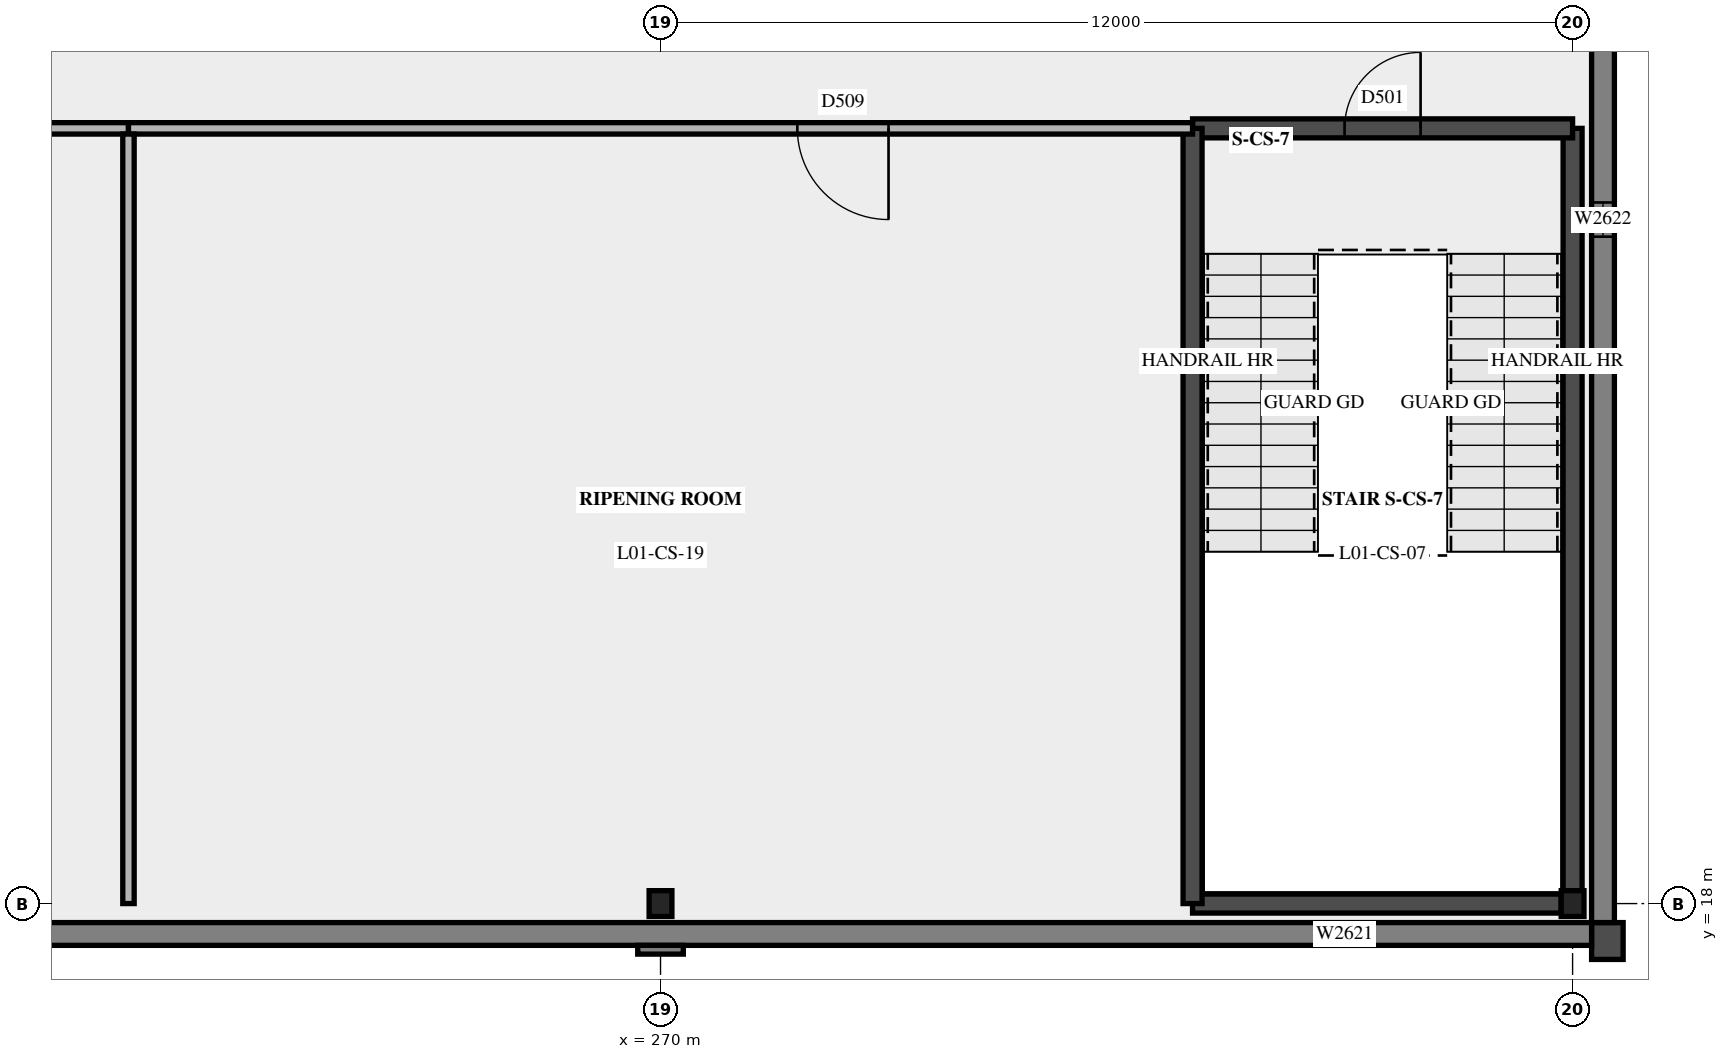
"""IFC4 building model, lengths in metres.
Left out: names, types, materials, properties, quantities, classifications, styles, units other than length and angle.
Written with IfcOpenShell. Run it as: python <this file> out.ifc"""

import sys

from ifc_helpers import new_model, si_unit, direction, frame, frame_2d, origin, origin_2d, place, context, subcontext, project, spatial, polyline, rectangle, i_section, outline, extrude, element, fill, save


model = new_model("IFC4")
c1 = context("Model", 3, precision=1e-05, world=origin(), true_north=direction((0.0, 1.0)))
c2 = subcontext(c1, "Body", "Model", "MODEL_VIEW")
j1 = project(units=[si_unit("LENGTHUNIT", "METRE"), si_unit("PLANEANGLEUNIT", "RADIAN")], contexts=[c1])
p1 = place(None, origin())
s1 = spatial("IfcSite", under=j1, at=p1, CompositionType="ELEMENT")
p2 = place(p1, origin())
s2 = spatial("IfcBuilding", under=s1, at=p2, CompositionType="ELEMENT")
p3 = place(p2, frame((0.0, 0.0, 5.4)))
s3 = spatial("IfcBuildingStorey", under=s2, at=p3, CompositionType="ELEMENT", Elevation=5.4)
for number, where, z_axis, x_axis in (
    (1, (270.0, 18.0, 0.0), (0.0, 0.0, 1.0), (1.0, 0.0, 0.0)),
    (2, (282.0, 18.0, 0.0), (0.0, 0.0, 1.0), (1.0, 0.0, 0.0)),
):
    element("IfcColumn", number, at=place(p3, frame(where, z_axis=z_axis, x_axis=x_axis)), inside=s3, PredefinedType="COLUMN", context=c2, shape_type="SweptSolid", body=[
        extrude(i_section(OverallWidth=0.3, OverallDepth=0.34, WebThickness=0.012, FlangeThickness=0.021, at=origin_2d()), origin(), (0.0, 0.0, 1.0), 5.4),
    ])
p4 = place(p3, frame((277.0, 18.0, 0.0), z_axis=(0.0, 0.0, 1.0), x_axis=(1.0, 0.0, 0.0)))
e3 = element("IfcWall", 3, at=p4, inside=s3, PredefinedType="SHEAR", context=c2, shape_type="SweptSolid", body=[
    extrude(rectangle(XDim=4.85, YDim=0.25, at=frame_2d((2.425, 0.0))), origin(), (0.0, 0.0, 1.0), 5.4),
])
p5 = place(p3, frame((282.0, 18.17, 0.0), z_axis=(0.0, 0.0, 1.0), x_axis=(0.0, 1.0, 0.0)))
e4 = element("IfcWall", 4, at=p5, inside=s3, PredefinedType="SHEAR", context=c2, shape_type="SweptSolid", body=[
    extrude(rectangle(XDim=10.03, YDim=0.25, at=frame_2d((5.015, 0.0))), origin(), (0.0, 0.0, 1.0), 5.4),
])
p6 = place(p3, frame((277.0, 28.2, 0.0), z_axis=(0.0, 0.0, 1.0), x_axis=(1.0, 0.0, 0.0)))
e5 = element("IfcWall", 5, at=p6, inside=s3, PredefinedType="SHEAR", context=c2, shape_type="SweptSolid", body=[
    extrude(rectangle(XDim=5.0, YDim=0.25, at=frame_2d((2.5, 0.0))), origin(), (0.0, 0.0, 1.0), 5.4),
])
p7 = place(p6, frame((2.0, 0.0, 0.0)))
e6 = element("IfcOpeningElement", 6, at=p7, cuts=e5, PredefinedType="OPENING", context=c2, shape_type="SweptSolid", body=[
    extrude(rectangle(XDim=1.0, YDim=2.1, at=frame_2d((0.5, 1.05))), frame((0.0, 0.135, 0.0), z_axis=(0.0, -1.0, 0.0), x_axis=(1.0, 0.0, 0.0)), (0.0, 0.0, 1.0), 0.27),
])
p8 = place(p3, frame((277.0, 18.0, 0.0), z_axis=(0.0, 0.0, 1.0), x_axis=(0.0, 1.0, 0.0)))
e7 = element("IfcWall", 7, at=p8, inside=s3, PredefinedType="SHEAR", context=c2, shape_type="SweptSolid", body=[
    extrude(rectangle(XDim=10.2, YDim=0.25, at=frame_2d((5.1, 0.0))), origin(), (0.0, 0.0, 1.0), 5.4),
])
p9 = place(p3, frame((282.25, 17.472, -0.39), z_axis=(0.0, 0.0, 1.0), x_axis=(1.0, 0.0, 0.0)))
e8 = element("IfcWall", 8, at=p9, inside=s3, PredefinedType="SOLIDWALL", context=c2, shape_type="SweptSolid", body=[
    extrude(rectangle(XDim=0.53, YDim=0.555, at=frame_2d((0.265, 0.0))), origin(), (0.0, 0.0, 1.0), 0.13),
])
p10 = place(p3, frame((282.25, 17.438, -0.26), z_axis=(0.0, 0.0, 1.0), x_axis=(1.0, 0.0, 0.0)))
e9 = element("IfcWall", 9, at=p10, inside=s3, PredefinedType="SOLIDWALL", context=c2, shape_type="SweptSolid", body=[
    extrude(rectangle(XDim=0.645, YDim=0.625, at=frame_2d((0.323, 0.0))), origin(), (0.0, 0.0, 1.0), 0.13),
])
p11 = place(p3, frame((282.25, 17.403, -0.13), z_axis=(0.0, 0.0, 1.0), x_axis=(1.0, 0.0, 0.0)))
e10 = element("IfcWall", 10, at=p11, inside=s3, PredefinedType="SOLIDWALL", context=c2, shape_type="SweptSolid", body=[
    extrude(rectangle(XDim=0.76, YDim=0.695, at=frame_2d((0.38, 0.0))), origin(), (0.0, 0.0, 1.0), 0.13),
])
p12 = place(p3, frame((282.25, 17.508, 0.0), z_axis=(0.0, 0.0, 1.0), x_axis=(1.0, 0.0, 0.0)))
e11 = element("IfcWall", 11, at=p12, inside=s3, PredefinedType="SOLIDWALL", context=c2, shape_type="SweptSolid", body=[
    extrude(rectangle(XDim=0.415, YDim=0.485, at=frame_2d((0.208, 0.0))), origin(), (0.0, 0.0, 1.0), 5.01),
])
p13 = place(p3, frame((282.25, 17.472, 5.01), z_axis=(0.0, 0.0, 1.0), x_axis=(1.0, 0.0, 0.0)))
e12 = element("IfcWall", 12, at=p13, inside=s3, PredefinedType="SOLIDWALL", context=c2, shape_type="SweptSolid", body=[
    extrude(rectangle(XDim=0.53, YDim=0.555, at=frame_2d((0.265, 0.0))), origin(), (0.0, 0.0, 1.0), 0.13),
])
p14 = place(p3, frame((282.25, 17.438, 5.14), z_axis=(0.0, 0.0, 1.0), x_axis=(1.0, 0.0, 0.0)))
e13 = element("IfcWall", 13, at=p14, inside=s3, PredefinedType="SOLIDWALL", context=c2, shape_type="SweptSolid", body=[
    extrude(rectangle(XDim=0.645, YDim=0.625, at=frame_2d((0.323, 0.0))), origin(), (0.0, 0.0, 1.0), 0.13),
])
p15 = place(p3, frame((282.25, 17.403, 5.27), z_axis=(0.0, 0.0, 1.0), x_axis=(1.0, 0.0, 0.0)))
e14 = element("IfcWall", 14, at=p15, inside=s3, PredefinedType="SOLIDWALL", context=c2, shape_type="SweptSolid", body=[
    extrude(rectangle(XDim=0.76, YDim=0.695, at=frame_2d((0.38, 0.0))), origin(), (0.0, 0.0, 1.0), 0.13),
])
p16 = place(p3, frame((197.75, 17.6, 0.0), z_axis=(0.0, 0.0, 1.0), x_axis=(1.0, 0.0, 0.0)))
e15 = element("IfcWall", 15, at=p16, inside=s3, PredefinedType="SOLIDWALL", context=c2, shape_type="SweptSolid", body=[
    extrude(rectangle(XDim=84.5, YDim=0.3, at=frame_2d((42.25, 0.0))), origin(), (0.0, 0.0, 1.0), 5.4),
])
p17 = place(p16, frame((9.025, 0.0, 1.8)))
e16 = element("IfcOpeningElement", 16, at=p17, cuts=e15, PredefinedType="OPENING", context=c2, shape_type="SweptSolid", body=[
    extrude(rectangle(XDim=0.45, YDim=2.4, at=frame_2d((0.225, 1.2))), frame((0.0, 0.16, 0.0), z_axis=(0.0, -1.0, 0.0), x_axis=(1.0, 0.0, 0.0)), (0.0, 0.0, 1.0), 0.32),
])
p18 = place(p16, frame((33.025, 0.0, 1.8)))
e17 = element("IfcOpeningElement", 17, at=p18, cuts=e15, PredefinedType="OPENING", context=c2, shape_type="SweptSolid", body=[
    extrude(rectangle(XDim=0.45, YDim=2.4, at=frame_2d((0.225, 1.2))), frame((0.0, 0.16, 0.0), z_axis=(0.0, -1.0, 0.0), x_axis=(1.0, 0.0, 0.0)), (0.0, 0.0, 1.0), 0.32),
])
p19 = place(p16, frame((45.025, 0.0, 1.8)))
e18 = element("IfcOpeningElement", 18, at=p19, cuts=e15, PredefinedType="OPENING", context=c2, shape_type="SweptSolid", body=[
    extrude(rectangle(XDim=0.45, YDim=2.4, at=frame_2d((0.225, 1.2))), frame((0.0, 0.16, 0.0), z_axis=(0.0, -1.0, 0.0), x_axis=(1.0, 0.0, 0.0)), (0.0, 0.0, 1.0), 0.32),
])
p20 = place(p16, frame((57.025, 0.0, 1.8)))
e19 = element("IfcOpeningElement", 19, at=p20, cuts=e15, PredefinedType="OPENING", context=c2, shape_type="SweptSolid", body=[
    extrude(rectangle(XDim=0.45, YDim=2.4, at=frame_2d((0.225, 1.2))), frame((0.0, 0.16, 0.0), z_axis=(0.0, -1.0, 0.0), x_axis=(1.0, 0.0, 0.0)), (0.0, 0.0, 1.0), 0.32),
])
p21 = place(p16, frame((81.025, 0.0, 1.8)))
e20 = element("IfcOpeningElement", 20, at=p21, cuts=e15, PredefinedType="OPENING", context=c2, shape_type="SweptSolid", body=[
    extrude(rectangle(XDim=0.45, YDim=2.4, at=frame_2d((0.225, 1.2))), frame((0.0, 0.16, 0.0), z_axis=(0.0, -1.0, 0.0), x_axis=(1.0, 0.0, 0.0)), (0.0, 0.0, 1.0), 0.32),
])
p22 = place(p3, frame((269.7, 17.393, 0.0), z_axis=(0.0, 0.0, 1.0), x_axis=(1.0, 0.0, 0.0)))
e21 = element("IfcWall", 21, at=p22, inside=s3, PredefinedType="SOLIDWALL", context=c2, shape_type="SweptSolid", body=[
    extrude(rectangle(XDim=0.6, YDim=0.115, at=frame_2d((0.3, 0.0))), origin(), (0.0, 0.0, 1.0), 5.4),
])
p23 = place(p3, frame((282.4, 17.75, 0.0), z_axis=(0.0, 0.0, 1.0), x_axis=(0.0, 1.0, 0.0)))
e22 = element("IfcWall", 22, at=p23, inside=s3, PredefinedType="SOLIDWALL", context=c2, shape_type="SweptSolid", body=[
    extrude(rectangle(XDim=48.5, YDim=0.3, at=frame_2d((24.25, 0.0))), origin(), (0.0, 0.0, 1.0), 5.4),
])
p24 = place(p23, frame((9.025, 0.0, 1.8)))
e23 = element("IfcOpeningElement", 23, at=p24, cuts=e22, PredefinedType="OPENING", context=c2, shape_type="SweptSolid", body=[
    extrude(rectangle(XDim=0.45, YDim=2.4, at=frame_2d((0.225, 1.2))), frame((0.0, 0.16, 0.0), z_axis=(0.0, -1.0, 0.0), x_axis=(1.0, 0.0, 0.0)), (0.0, 0.0, 1.0), 0.32),
])
p25 = place(p23, frame((33.025, 0.0, 1.8)))
e24 = element("IfcOpeningElement", 24, at=p25, cuts=e22, PredefinedType="OPENING", context=c2, shape_type="SweptSolid", body=[
    extrude(rectangle(XDim=0.45, YDim=2.4, at=frame_2d((0.225, 1.2))), frame((0.0, 0.16, 0.0), z_axis=(0.0, -1.0, 0.0), x_axis=(1.0, 0.0, 0.0)), (0.0, 0.0, 1.0), 0.32),
])
p26 = place(p23, frame((45.025, 0.0, 1.8)))
e25 = element("IfcOpeningElement", 25, at=p26, cuts=e22, PredefinedType="OPENING", context=c2, shape_type="SweptSolid", body=[
    extrude(rectangle(XDim=0.45, YDim=2.4, at=frame_2d((0.225, 1.2))), frame((0.0, 0.16, 0.0), z_axis=(0.0, -1.0, 0.0), x_axis=(1.0, 0.0, 0.0)), (0.0, 0.0, 1.0), 0.32),
])
p27 = place(p3, frame((239.0, 28.2, 0.0), z_axis=(0.0, 0.0, 1.0), x_axis=(1.0, 0.0, 0.0)))
e26 = element("IfcWall", 26, at=p27, inside=s3, PredefinedType="PARTITIONING", context=c2, shape_type="SweptSolid", body=[
    extrude(outline(polyline([(0.0, 0.0), (24.0, 0.0), (24.0, 5.15), (23.905, 5.15), (23.9, 4.63), (23.7, 4.63), (23.695, 5.15), (21.505, 5.15), (21.5, 4.63), (21.3, 4.63), (21.295, 5.15), (19.1, 5.15), (19.095, 4.68), (18.905, 4.68), (18.9, 5.15), (16.705, 5.15), (16.7, 4.63), (16.5, 4.63), (16.495, 5.15), (14.305, 5.15), (14.3, 4.63), (14.1, 4.63), (14.095, 5.15), (11.905, 5.15), (11.9, 4.63), (11.7, 4.63), (11.695, 5.15), (9.505, 5.15), (9.5, 4.63), (9.3, 4.63), (9.295, 5.15), (7.1, 5.15), (7.095, 4.68), (6.905, 4.68), (6.9, 5.15), (4.705, 5.15), (4.7, 4.63), (4.5, 4.63), (4.495, 5.15), (2.305, 5.15), (2.3, 4.63), (2.1, 4.63), (2.095, 5.15), (0.0, 5.15), (0.0, 0.0)])), frame((0.0, 0.075, 0.0), z_axis=(0.0, -1.0, 0.0), x_axis=(1.0, 0.0, 0.0)), (0.0, 0.0, 1.0), 0.15),
])
p28 = place(p27, frame((11.4, 0.0, 0.0)))
e27 = element("IfcOpeningElement", 27, at=p28, cuts=e26, PredefinedType="OPENING", context=c2, shape_type="SweptSolid", body=[
    extrude(rectangle(XDim=1.2, YDim=2.4, at=frame_2d((0.6, 1.2))), frame((0.0, 0.085, 0.0), z_axis=(0.0, -1.0, 0.0), x_axis=(1.0, 0.0, 0.0)), (0.0, 0.0, 1.0), 0.17),
])
p29 = place(p3, frame((263.0, 28.2, 0.0), z_axis=(0.0, 0.0, 1.0), x_axis=(1.0, 0.0, 0.0)))
e28 = element("IfcWall", 28, at=p29, inside=s3, PredefinedType="PARTITIONING", context=c2, shape_type="SweptSolid", body=[
    extrude(outline(polyline([(0.0, 0.0), (14.0, 0.0), (14.0, 5.15), (11.905, 5.15), (11.9, 4.63), (11.7, 4.63), (11.695, 5.15), (9.505, 5.15), (9.5, 4.63), (9.3, 4.63), (9.295, 5.15), (7.1, 5.15), (7.095, 4.68), (6.905, 4.68), (6.9, 5.15), (4.705, 5.15), (4.7, 4.63), (4.5, 4.63), (4.495, 5.15), (2.305, 5.15), (2.3, 4.63), (2.1, 4.63), (2.095, 5.15), (0.0, 5.15), (0.0, 0.0)])), frame((0.0, 0.075, 0.0), z_axis=(0.0, -1.0, 0.0), x_axis=(1.0, 0.0, 0.0)), (0.0, 0.0, 1.0), 0.15),
])
p30 = place(p29, frame((8.8, 0.0, 0.0)))
e29 = element("IfcOpeningElement", 29, at=p30, cuts=e28, PredefinedType="OPENING", context=c2, shape_type="SweptSolid", body=[
    extrude(rectangle(XDim=1.2, YDim=2.4, at=frame_2d((0.6, 1.2))), frame((0.0, 0.085, 0.0), z_axis=(0.0, -1.0, 0.0), x_axis=(1.0, 0.0, 0.0)), (0.0, 0.0, 1.0), 0.17),
])
p31 = place(p3, frame((263.0, 18.0, 0.0), z_axis=(0.0, 0.0, 1.0), x_axis=(0.0, 1.0, 0.0)))
e30 = element("IfcWall", 30, at=p31, inside=s3, PredefinedType="PARTITIONING", context=c2, shape_type="SweptSolid", body=[
    extrude(outline(polyline([(0.0, 0.0), (10.125, 0.0), (10.125, 5.15), (0.105, 5.15), (0.1, 4.63), (0.0, 4.63), (0.0, 0.0)])), frame((0.0, 0.075, 0.0), z_axis=(0.0, -1.0, 0.0), x_axis=(1.0, 0.0, 0.0)), (0.0, 0.0, 1.0), 0.15),
])
p32 = place(p21, origin())
e31 = element("IfcWindow", 31, at=p32, inside=s3, PartitioningType="SINGLE_PANEL", PredefinedType="WINDOW", context=c2, shape_type="SweptSolid", body=[
    extrude(rectangle(XDim=0.45, YDim=2.4, at=frame_2d((0.225, 1.2))), frame((0.0, 0.03, 0.0), z_axis=(0.0, -1.0, 0.0), x_axis=(1.0, 0.0, 0.0)), (0.0, 0.0, 1.0), 0.06),
])
fill(e20, e31)
p33 = place(p24, origin())
e32 = element("IfcWindow", 32, at=p33, inside=s3, PartitioningType="SINGLE_PANEL", PredefinedType="WINDOW", context=c2, shape_type="SweptSolid", body=[
    extrude(rectangle(XDim=0.45, YDim=2.4, at=frame_2d((0.225, 1.2))), frame((0.0, 0.03, 0.0), z_axis=(0.0, -1.0, 0.0), x_axis=(1.0, 0.0, 0.0)), (0.0, 0.0, 1.0), 0.06),
])
fill(e23, e32)
p34 = place(p7, origin())
e33 = element("IfcDoor", 33, at=p34, inside=s3, OperationType="SINGLE_SWING_RIGHT", PredefinedType="DOOR", context=c2, shape_type="SweptSolid", body=[
    extrude(rectangle(XDim=1.0, YDim=2.1, at=frame_2d((0.5, 1.05))), frame((0.0, 0.025, 0.0), z_axis=(0.0, -1.0, 0.0), x_axis=(1.0, 0.0, 0.0)), (0.0, 0.0, 1.0), 0.05),
])
fill(e6, e33)
p35 = place(p30, origin())
e34 = element("IfcDoor", 34, at=p35, inside=s3, OperationType="SINGLE_SWING_LEFT", PredefinedType="DOOR", context=c2, shape_type="SweptSolid", body=[
    extrude(rectangle(XDim=1.2, YDim=2.4, at=frame_2d((0.6, 1.2))), frame((0.0, 0.025, 0.0), z_axis=(0.0, -1.0, 0.0), x_axis=(1.0, 0.0, 0.0)), (0.0, 0.0, 1.0), 0.05),
])
fill(e29, e34)
save(model, sys.argv[1])
